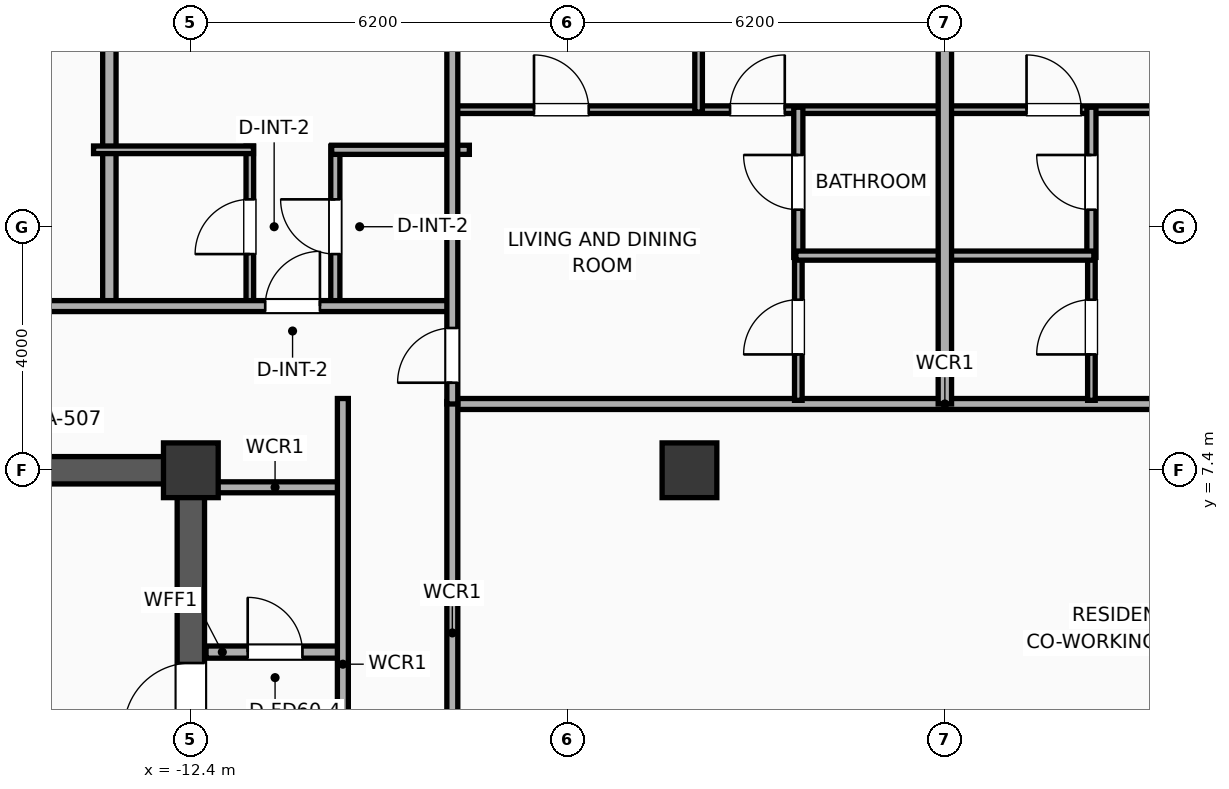
"""IFC4 building model, lengths in metres.
Left out: names, types, materials, properties, quantities, classifications, styles, units other than length and angle.
Written with IfcOpenShell. Run it as: python <this file> out.ifc"""

import sys

from ifc_helpers import new_model, si_unit, direction, frame, frame_2d, origin, origin_2d, place, context, subcontext, project, spatial, rectangle, extrude, element, fill, save


model = new_model("IFC4")
c1 = context("Model", 3, precision=1e-05, world=origin(), true_north=direction((0.0, 1.0)))
c2 = subcontext(c1, "Body", "Model", "MODEL_VIEW")
j1 = project(units=[si_unit("LENGTHUNIT", "METRE"), si_unit("PLANEANGLEUNIT", "RADIAN")], contexts=[c1])
p1 = place(None, origin())
s1 = spatial("IfcSite", under=j1, at=p1, CompositionType="ELEMENT")
p2 = place(p1, origin())
s2 = spatial("IfcBuilding", under=s1, at=p2, CompositionType="ELEMENT")
p3 = place(p2, frame((0.0, 0.0, 200.2)))
s3 = spatial("IfcBuildingStorey", under=s2, at=p3, CompositionType="ELEMENT", Elevation=200.2)
p4 = place(p3, frame((-12.4, 7.4, 0.0), z_axis=(0.0, 0.0, 1.0), x_axis=(1.0, 0.0, 0.0)))
e1 = element("IfcColumn", 1, at=p4, inside=s3, PredefinedType="COLUMN", context=c2, shape_type="SweptSolid", body=[
    extrude(rectangle(XDim=0.9, YDim=0.9, at=origin_2d()), origin(), (0.0, 0.0, 1.0), 3.9),
])
p5 = place(p3, frame((-19.425, 7.4, 0.0), z_axis=(0.0, 0.0, 1.0), x_axis=(1.0, 0.0, 0.0)))
e2 = element("IfcWall", 2, at=p5, inside=s3, PredefinedType="SHEAR", context=c2, shape_type="SweptSolid", body=[
    extrude(rectangle(XDim=7.25, YDim=0.45, at=frame_2d((3.625, 0.0))), origin(), (0.0, 0.0, 1.0), 3.65),
])
p6 = place(p3, frame((-12.4, -7.4, 0.0), z_axis=(0.0, 0.0, 1.0), x_axis=(0.0, 1.0, 0.0)))
e3 = element("IfcWall", 3, at=p6, inside=s3, PredefinedType="SHEAR", context=c2, shape_type="SweptSolid", body=[
    extrude(rectangle(XDim=14.8, YDim=0.45, at=frame_2d((7.4, 0.0))), origin(), (0.0, 0.0, 1.0), 3.65),
])
p7 = place(p6, frame((6.05, 0.0, 0.0)))
e4 = element("IfcOpeningElement", 4, at=p7, cuts=e3, PredefinedType="OPENING", context=c2, shape_type="SweptSolid", body=[
    extrude(rectangle(XDim=1.1, YDim=2.05, at=frame_2d((0.55, 1.025))), frame((0.0, 0.235, 0.0), z_axis=(0.0, -1.0, 0.0), x_axis=(1.0, 0.0, 0.0)), (0.0, 0.0, 1.0), 0.47),
])
p8 = place(p6, frame((8.6, 0.0, 0.0)))
e5 = element("IfcOpeningElement", 5, at=p8, cuts=e3, PredefinedType="OPENING", context=c2, shape_type="SweptSolid", body=[
    extrude(rectangle(XDim=1.1, YDim=2.05, at=frame_2d((0.55, 1.025))), frame((0.0, 0.235, 0.0), z_axis=(0.0, -1.0, 0.0), x_axis=(1.0, 0.0, 0.0)), (0.0, 0.0, 1.0), 0.47),
])
p9 = place(p6, frame((10.53, 0.0, 0.0)))
e6 = element("IfcOpeningElement", 6, at=p9, cuts=e3, PredefinedType="OPENING", context=c2, shape_type="SweptSolid", body=[
    extrude(rectangle(XDim=1.1, YDim=2.05, at=frame_2d((0.55, 1.025))), frame((0.0, 0.235, 0.0), z_axis=(0.0, -1.0, 0.0), x_axis=(1.0, 0.0, 0.0)), (0.0, 0.0, 1.0), 0.47),
])
p10 = place(p6, frame((2.25, 0.0, 0.0)))
e7 = element("IfcOpeningElement", 7, at=p10, cuts=e3, PredefinedType="OPENING", context=c2, shape_type="SweptSolid", body=[
    extrude(rectangle(XDim=0.9, YDim=2.05, at=frame_2d((0.45, 1.025))), frame((0.0, 0.235, 0.0), z_axis=(0.0, -1.0, 0.0), x_axis=(1.0, 0.0, 0.0)), (0.0, 0.0, 1.0), 0.47),
])
p11 = place(p3, frame((-4.2, 7.4, 0.0), z_axis=(0.0, 0.0, 1.0), x_axis=(1.0, 0.0, 0.0)))
e8 = element("IfcColumn", 8, at=p11, inside=s3, PredefinedType="COLUMN", context=c2, shape_type="SweptSolid", body=[
    extrude(rectangle(XDim=0.9, YDim=0.9, at=origin_2d()), origin(), (0.0, 0.0, 1.0), 3.9),
])
p12 = place(p3, frame((-12.15, 4.41, 0.0), z_axis=(0.0, 0.0, 1.0), x_axis=(1.0, 0.0, 0.0)))
e9 = element("IfcWall", 9, at=p12, inside=s3, PredefinedType="PARTITIONING", context=c2, shape_type="SweptSolid", body=[
    extrude(rectangle(XDim=2.27, YDim=0.2, at=frame_2d((1.135, 0.0))), origin(), (0.0, 0.0, 1.0), 3.65),
])
p13 = place(p12, frame((0.685, 0.0, 0.0)))
e10 = element("IfcOpeningElement", 10, at=p13, cuts=e9, PredefinedType="OPENING", context=c2, shape_type="SweptSolid", body=[
    extrude(rectangle(XDim=0.9, YDim=2.05, at=frame_2d((0.45, 1.025))), frame((0.0, 0.11, 0.0), z_axis=(0.0, -1.0, 0.0), x_axis=(1.0, 0.0, 0.0)), (0.0, 0.0, 1.0), 0.22),
])
p14 = place(p3, frame((-12.15, 7.12, 0.0), z_axis=(0.0, 0.0, 1.0), x_axis=(1.0, 0.0, 0.0)))
e11 = element("IfcWall", 11, at=p14, inside=s3, PredefinedType="PARTITIONING", context=c2, shape_type="SweptSolid", body=[
    extrude(rectangle(XDim=2.27, YDim=0.18, at=frame_2d((1.135, 0.0))), origin(), (0.0, 0.0, 1.0), 3.65),
])
p15 = place(p3, frame((-9.9, -8.58, 0.0), z_axis=(0.0, 0.0, 1.0), x_axis=(0.0, 1.0, 0.0)))
e12 = element("IfcWall", 12, at=p15, inside=s3, PredefinedType="PARTITIONING", context=c2, shape_type="SweptSolid", body=[
    extrude(rectangle(XDim=17.16, YDim=0.18, at=frame_2d((8.58, 0.0))), origin(), (0.0, 0.0, 1.0), 3.65),
])
p16 = place(p15, frame((7.172, 0.0, 0.0)))
e13 = element("IfcOpeningElement", 13, at=p16, cuts=e12, PredefinedType="OPENING", context=c2, shape_type="SweptSolid", body=[
    extrude(rectangle(XDim=1.1, YDim=2.05, at=frame_2d((0.55, 1.025))), frame((0.0, 0.1, 0.0), z_axis=(0.0, -1.0, 0.0), x_axis=(1.0, 0.0, 0.0)), (0.0, 0.0, 1.0), 0.2),
])
p17 = place(p3, frame((-8.15, 8.49, 0.0), z_axis=(0.0, 0.0, 1.0), x_axis=(1.0, 0.0, 0.0)))
e14 = element("IfcWall", 14, at=p17, inside=s3, PredefinedType="PARTITIONING", context=c2, shape_type="SweptSolid", body=[
    extrude(rectangle(XDim=16.3, YDim=0.18, at=frame_2d((8.15, 0.0))), origin(), (0.0, 0.0, 1.0), 3.65),
])
p18 = place(p3, frame((-8.1, 0.92, 0.0), z_axis=(0.0, 0.0, 1.0), x_axis=(0.0, 1.0, 0.0)))
e15 = element("IfcWall", 15, at=p18, inside=s3, PredefinedType="PARTITIONING", context=c2, shape_type="SweptSolid", body=[
    extrude(rectangle(XDim=7.61, YDim=0.18, at=frame_2d((3.805, 0.0))), origin(), (0.0, 0.0, 1.0), 3.65),
])
p19 = place(p3, frame((-13.74, 10.02, 0.0), z_axis=(0.0, 0.0, 1.0), x_axis=(0.0, 1.0, 0.0)))
e16 = element("IfcWall", 16, at=p19, inside=s3, PredefinedType="PARTITIONING", context=c2, shape_type="SweptSolid", body=[
    extrude(rectangle(XDim=10.01, YDim=0.22, at=frame_2d((5.005, 0.0))), origin(), (0.0, 0.0, 1.0), 3.65),
])
p20 = place(p3, frame((-11.43, 10.08, 0.0), z_axis=(0.0, 0.0, 1.0), x_axis=(0.0, 1.0, 0.0)))
e17 = element("IfcWall", 17, at=p20, inside=s3, PredefinedType="PARTITIONING", context=c2, shape_type="SweptSolid", body=[
    extrude(rectangle(XDim=2.65, YDim=0.125, at=frame_2d((1.325, 0.0))), origin(), (0.0, 0.0, 1.0), 3.65),
])
p21 = place(p20, frame((0.875, 0.0, 0.0)))
e18 = element("IfcOpeningElement", 18, at=p21, cuts=e17, PredefinedType="OPENING", context=c2, shape_type="SweptSolid", body=[
    extrude(rectangle(XDim=0.9, YDim=2.05, at=frame_2d((0.45, 1.025))), frame((0.0, 0.073, 0.0), z_axis=(0.0, -1.0, 0.0), x_axis=(1.0, 0.0, 0.0)), (0.0, 0.0, 1.0), 0.145),
])
p22 = place(p3, frame((-10.024, 10.08, 0.0), z_axis=(0.0, 0.0, 1.0), x_axis=(0.0, 1.0, 0.0)))
e19 = element("IfcWall", 19, at=p22, inside=s3, PredefinedType="PLUMBINGWALL", context=c2, shape_type="SweptSolid", body=[
    extrude(rectangle(XDim=2.65, YDim=0.15, at=frame_2d((1.325, 0.0))), origin(), (0.0, 0.0, 1.0), 3.65),
])
p23 = place(p22, frame((0.875, 0.0, 0.0)))
e20 = element("IfcOpeningElement", 20, at=p23, cuts=e19, PredefinedType="OPENING", context=c2, shape_type="SweptSolid", body=[
    extrude(rectangle(XDim=0.9, YDim=2.05, at=frame_2d((0.45, 1.025))), frame((0.0, 0.085, 0.0), z_axis=(0.0, -1.0, 0.0), x_axis=(1.0, 0.0, 0.0)), (0.0, 0.0, 1.0), 0.17),
])
p24 = place(p3, frame((-14.0, 12.67, 0.0), z_axis=(0.0, 0.0, 1.0), x_axis=(1.0, 0.0, 0.0)))
e21 = element("IfcWall", 21, at=p24, inside=s3, PredefinedType="PARTITIONING", context=c2, shape_type="SweptSolid", body=[
    extrude(rectangle(XDim=2.63, YDim=0.125, at=frame_2d((1.315, 0.0))), origin(), (0.0, 0.0, 1.0), 3.65),
])
p25 = place(p3, frame((-10.084, 12.67, 0.0), z_axis=(0.0, 0.0, 1.0), x_axis=(1.0, 0.0, 0.0)))
e22 = element("IfcWall", 22, at=p25, inside=s3, PredefinedType="PLUMBINGWALL", context=c2, shape_type="SweptSolid", body=[
    extrude(rectangle(XDim=2.264, YDim=0.15, at=frame_2d((1.132, 0.0))), origin(), (0.0, 0.0, 1.0), 3.65),
])
p26 = place(p3, frame((-19.5, 10.1, 0.0), z_axis=(0.0, 0.0, 1.0), x_axis=(1.0, 0.0, 0.0)))
e23 = element("IfcWall", 23, at=p26, inside=s3, PredefinedType="PARTITIONING", context=c2, shape_type="SweptSolid", body=[
    extrude(rectangle(XDim=11.42, YDim=0.18, at=frame_2d((5.71, 0.0))), origin(), (0.0, 0.0, 1.0), 3.65),
])
p27 = place(p26, frame((3.464, 0.0, 0.0)))
e24 = element("IfcOpeningElement", 24, at=p27, cuts=e23, PredefinedType="OPENING", context=c2, shape_type="SweptSolid", body=[
    extrude(rectangle(XDim=1.15, YDim=2.05, at=frame_2d((0.575, 1.025))), frame((0.0, 0.1, 0.0), z_axis=(0.0, -1.0, 0.0), x_axis=(1.0, 0.0, 0.0)), (0.0, 0.0, 1.0), 0.2),
])
p28 = place(p26, frame((8.323, 0.0, 0.0)))
e25 = element("IfcOpeningElement", 25, at=p28, cuts=e23, PredefinedType="OPENING", context=c2, shape_type="SweptSolid", body=[
    extrude(rectangle(XDim=0.9, YDim=2.05, at=frame_2d((0.45, 1.025))), frame((0.0, 0.1, 0.0), z_axis=(0.0, -1.0, 0.0), x_axis=(1.0, 0.0, 0.0)), (0.0, 0.0, 1.0), 0.2),
])
p29 = place(p3, frame((-8.08, 13.33, 0.0), z_axis=(0.0, 0.0, 1.0), x_axis=(1.0, 0.0, 0.0)))
e26 = element("IfcWall", 26, at=p29, inside=s3, PredefinedType="PARTITIONING", context=c2, shape_type="SweptSolid", body=[
    extrude(rectangle(XDim=8.06, YDim=0.125, at=frame_2d((4.03, 0.0))), origin(), (0.0, 0.0, 1.0), 3.65),
])
p30 = place(p29, frame((1.323, 0.0, 0.0)))
e27 = element("IfcOpeningElement", 27, at=p30, cuts=e26, PredefinedType="OPENING", context=c2, shape_type="SweptSolid", body=[
    extrude(rectangle(XDim=0.9, YDim=2.05, at=frame_2d((0.45, 1.025))), frame((0.0, 0.073, 0.0), z_axis=(0.0, -1.0, 0.0), x_axis=(1.0, 0.0, 0.0)), (0.0, 0.0, 1.0), 0.145),
])
p31 = place(p29, frame((4.547, 0.0, 0.0)))
e28 = element("IfcOpeningElement", 28, at=p31, cuts=e26, PredefinedType="OPENING", context=c2, shape_type="SweptSolid", body=[
    extrude(rectangle(XDim=0.9, YDim=2.05, at=frame_2d((0.45, 1.025))), frame((0.0, 0.073, 0.0), z_axis=(0.0, -1.0, 0.0), x_axis=(1.0, 0.0, 0.0)), (0.0, 0.0, 1.0), 0.145),
])
p32 = place(p3, frame((-2.41, 8.55, 0.0), z_axis=(0.0, 0.0, 1.0), x_axis=(0.0, 1.0, 0.0)))
e29 = element("IfcWall", 29, at=p32, inside=s3, PredefinedType="PARTITIONING", context=c2, shape_type="SweptSolid", body=[
    extrude(rectangle(XDim=2.41, YDim=0.125, at=frame_2d((1.205, 0.0))), origin(), (0.0, 0.0, 1.0), 3.65),
])
p33 = place(p32, frame((0.755, 0.0, 0.0)))
e30 = element("IfcOpeningElement", 30, at=p33, cuts=e29, PredefinedType="OPENING", context=c2, shape_type="SweptSolid", body=[
    extrude(rectangle(XDim=0.9, YDim=2.05, at=frame_2d((0.45, 1.025))), frame((0.0, 0.073, 0.0), z_axis=(0.0, -1.0, 0.0), x_axis=(1.0, 0.0, 0.0)), (0.0, 0.0, 1.0), 0.145),
])
p34 = place(p3, frame((-2.41, 10.9, 0.0), z_axis=(0.0, 0.0, 1.0), x_axis=(0.0, 1.0, 0.0)))
e31 = element("IfcWall", 31, at=p34, inside=s3, PredefinedType="PLUMBINGWALL", context=c2, shape_type="SweptSolid", body=[
    extrude(rectangle(XDim=2.47, YDim=0.15, at=frame_2d((1.235, 0.0))), origin(), (0.0, 0.0, 1.0), 3.65),
])
p35 = place(p34, frame((0.785, 0.0, 0.0)))
e32 = element("IfcOpeningElement", 32, at=p35, cuts=e31, PredefinedType="OPENING", context=c2, shape_type="SweptSolid", body=[
    extrude(rectangle(XDim=0.9, YDim=2.05, at=frame_2d((0.45, 1.025))), frame((0.0, 0.085, 0.0), z_axis=(0.0, -1.0, 0.0), x_axis=(1.0, 0.0, 0.0)), (0.0, 0.0, 1.0), 0.17),
])
p36 = place(p3, frame((-2.45, 10.93, 0.0), z_axis=(0.0, 0.0, 1.0), x_axis=(1.0, 0.0, 0.0)))
e33 = element("IfcWall", 33, at=p36, inside=s3, PredefinedType="PLUMBINGWALL", context=c2, shape_type="SweptSolid", body=[
    extrude(rectangle(XDim=2.43, YDim=0.15, at=frame_2d((1.215, 0.0))), origin(), (0.0, 0.0, 1.0), 3.65),
])
p37 = place(p3, frame((-4.05, 13.29, 0.0), z_axis=(0.0, 0.0, 1.0), x_axis=(0.0, 1.0, 0.0)))
e34 = element("IfcWall", 34, at=p37, inside=s3, PredefinedType="PARTITIONING", context=c2, shape_type="SweptSolid", body=[
    extrude(rectangle(XDim=6.74, YDim=0.125, at=frame_2d((3.37, 0.0))), origin(), (0.0, 0.0, 1.0), 2.54),
])
p38 = place(p3, frame((-8.1, 8.49, 0.0), z_axis=(0.0, 0.0, 1.0), x_axis=(0.0, 1.0, 0.0)))
e35 = element("IfcWall", 35, at=p38, inside=s3, PredefinedType="PARTITIONING", context=c2, shape_type="SweptSolid", body=[
    extrude(rectangle(XDim=11.54, YDim=0.18, at=frame_2d((5.77, 0.0))), origin(), (0.0, 0.0, 1.0), 3.65),
])
p39 = place(p38, frame((0.35, 0.0, 0.0)))
e36 = element("IfcOpeningElement", 36, at=p39, cuts=e35, PredefinedType="OPENING", context=c2, shape_type="SweptSolid", body=[
    extrude(rectangle(XDim=0.9, YDim=2.05, at=frame_2d((0.45, 1.025))), frame((0.0, 0.1, 0.0), z_axis=(0.0, -1.0, 0.0), x_axis=(1.0, 0.0, 0.0)), (0.0, 0.0, 1.0), 0.2),
])
p40 = place(p3, frame((0.02, 13.33, 0.0), z_axis=(0.0, 0.0, 1.0), x_axis=(1.0, 0.0, 0.0)))
e37 = element("IfcWall", 37, at=p40, inside=s3, PredefinedType="PARTITIONING", context=c2, shape_type="SweptSolid", body=[
    extrude(rectangle(XDim=8.06, YDim=0.125, at=frame_2d((4.03, 0.0))), origin(), (0.0, 0.0, 1.0), 3.65),
])
p41 = place(p40, frame((1.323, 0.0, 0.0)))
e38 = element("IfcOpeningElement", 38, at=p41, cuts=e37, PredefinedType="OPENING", context=c2, shape_type="SweptSolid", body=[
    extrude(rectangle(XDim=0.9, YDim=2.05, at=frame_2d((0.45, 1.025))), frame((0.0, 0.073, 0.0), z_axis=(0.0, -1.0, 0.0), x_axis=(1.0, 0.0, 0.0)), (0.0, 0.0, 1.0), 0.145),
])
p42 = place(p40, frame((5.837, 0.0, 0.0)))
e39 = element("IfcOpeningElement", 39, at=p42, cuts=e37, PredefinedType="OPENING", context=c2, shape_type="SweptSolid", body=[
    extrude(rectangle(XDim=0.9, YDim=2.05, at=frame_2d((0.45, 1.025))), frame((0.0, 0.073, 0.0), z_axis=(0.0, -1.0, 0.0), x_axis=(1.0, 0.0, 0.0)), (0.0, 0.0, 1.0), 0.145),
])
p43 = place(p3, frame((2.41, 8.55, 0.0), z_axis=(0.0, 0.0, 1.0), x_axis=(0.0, 1.0, 0.0)))
e40 = element("IfcWall", 40, at=p43, inside=s3, PredefinedType="PARTITIONING", context=c2, shape_type="SweptSolid", body=[
    extrude(rectangle(XDim=2.41, YDim=0.125, at=frame_2d((1.205, 0.0))), origin(), (0.0, 0.0, 1.0), 3.65),
])
p44 = place(p43, frame((0.755, 0.0, 0.0)))
e41 = element("IfcOpeningElement", 41, at=p44, cuts=e40, PredefinedType="OPENING", context=c2, shape_type="SweptSolid", body=[
    extrude(rectangle(XDim=0.9, YDim=2.05, at=frame_2d((0.45, 1.025))), frame((0.0, 0.073, 0.0), z_axis=(0.0, -1.0, 0.0), x_axis=(1.0, 0.0, 0.0)), (0.0, 0.0, 1.0), 0.145),
])
p45 = place(p3, frame((2.41, 10.9, 0.0), z_axis=(0.0, 0.0, 1.0), x_axis=(0.0, 1.0, 0.0)))
e42 = element("IfcWall", 42, at=p45, inside=s3, PredefinedType="PLUMBINGWALL", context=c2, shape_type="SweptSolid", body=[
    extrude(rectangle(XDim=2.47, YDim=0.15, at=frame_2d((1.235, 0.0))), origin(), (0.0, 0.0, 1.0), 3.65),
])
p46 = place(p45, frame((0.785, 0.0, 0.0)))
e43 = element("IfcOpeningElement", 43, at=p46, cuts=e42, PredefinedType="OPENING", context=c2, shape_type="SweptSolid", body=[
    extrude(rectangle(XDim=0.9, YDim=2.05, at=frame_2d((0.45, 1.025))), frame((0.0, 0.085, 0.0), z_axis=(0.0, -1.0, 0.0), x_axis=(1.0, 0.0, 0.0)), (0.0, 0.0, 1.0), 0.17),
])
p47 = place(p3, frame((0.02, 10.93, 0.0), z_axis=(0.0, 0.0, 1.0), x_axis=(1.0, 0.0, 0.0)))
e44 = element("IfcWall", 44, at=p47, inside=s3, PredefinedType="PLUMBINGWALL", context=c2, shape_type="SweptSolid", body=[
    extrude(rectangle(XDim=2.43, YDim=0.15, at=frame_2d((1.215, 0.0))), origin(), (0.0, 0.0, 1.0), 3.65),
])
p48 = place(p3, frame((0.0, 8.49, 0.0), z_axis=(0.0, 0.0, 1.0), x_axis=(0.0, 1.0, 0.0)))
e45 = element("IfcWall", 45, at=p48, inside=s3, PredefinedType="PARTITIONING", context=c2, shape_type="SweptSolid", body=[
    extrude(rectangle(XDim=11.54, YDim=0.22, at=frame_2d((5.77, 0.0))), origin(), (0.0, 0.0, 1.0), 3.65),
])
p49 = place(p13, origin())
e46 = element("IfcDoor", 46, at=p49, inside=s3, OperationType="SINGLE_SWING_LEFT", PredefinedType="DOOR", context=c2, shape_type="SweptSolid", body=[
    extrude(rectangle(XDim=0.9, YDim=2.05, at=frame_2d((0.45, 1.025))), frame((0.0, 0.025, 0.0), z_axis=(0.0, -1.0, 0.0), x_axis=(1.0, 0.0, 0.0)), (0.0, 0.0, 1.0), 0.05),
])
fill(e10, e46)
p50 = place(p21, origin())
e47 = element("IfcDoor", 47, at=p50, inside=s3, OperationType="SINGLE_SWING_LEFT", PredefinedType="DOOR", context=c2, shape_type="SweptSolid", body=[
    extrude(rectangle(XDim=0.9, YDim=2.05, at=frame_2d((0.45, 1.025))), frame((0.0, 0.025, 0.0), z_axis=(0.0, -1.0, 0.0), x_axis=(1.0, 0.0, 0.0)), (0.0, 0.0, 1.0), 0.05),
])
fill(e18, e47)
p51 = place(p23, origin())
e48 = element("IfcDoor", 48, at=p51, inside=s3, OperationType="SINGLE_SWING_RIGHT", PredefinedType="DOOR", context=c2, shape_type="SweptSolid", body=[
    extrude(rectangle(XDim=0.9, YDim=2.05, at=frame_2d((0.45, 1.025))), frame((0.0, 0.025, 0.0), z_axis=(0.0, -1.0, 0.0), x_axis=(1.0, 0.0, 0.0)), (0.0, 0.0, 1.0), 0.05),
])
fill(e20, e48)
p52 = place(p28, origin())
e49 = element("IfcDoor", 49, at=p52, inside=s3, OperationType="SINGLE_SWING_RIGHT", PredefinedType="DOOR", context=c2, shape_type="SweptSolid", body=[
    extrude(rectangle(XDim=0.9, YDim=2.05, at=frame_2d((0.45, 1.025))), frame((0.0, 0.025, 0.0), z_axis=(0.0, -1.0, 0.0), x_axis=(1.0, 0.0, 0.0)), (0.0, 0.0, 1.0), 0.05),
])
fill(e25, e49)
p53 = place(p30, origin())
e50 = element("IfcDoor", 50, at=p53, inside=s3, OperationType="SINGLE_SWING_LEFT", PredefinedType="DOOR", context=c2, shape_type="SweptSolid", body=[
    extrude(rectangle(XDim=0.9, YDim=2.05, at=frame_2d((0.45, 1.025))), frame((0.0, 0.025, 0.0), z_axis=(0.0, -1.0, 0.0), x_axis=(1.0, 0.0, 0.0)), (0.0, 0.0, 1.0), 0.05),
])
fill(e27, e50)
p54 = place(p31, origin())
e51 = element("IfcDoor", 51, at=p54, inside=s3, OperationType="SINGLE_SWING_RIGHT", PredefinedType="DOOR", context=c2, shape_type="SweptSolid", body=[
    extrude(rectangle(XDim=0.9, YDim=2.05, at=frame_2d((0.45, 1.025))), frame((0.0, 0.025, 0.0), z_axis=(0.0, -1.0, 0.0), x_axis=(1.0, 0.0, 0.0)), (0.0, 0.0, 1.0), 0.05),
])
fill(e28, e51)
p55 = place(p33, origin())
e52 = element("IfcDoor", 52, at=p55, inside=s3, OperationType="SINGLE_SWING_LEFT", PredefinedType="DOOR", context=c2, shape_type="SweptSolid", body=[
    extrude(rectangle(XDim=0.9, YDim=2.05, at=frame_2d((0.45, 1.025))), frame((0.0, 0.025, 0.0), z_axis=(0.0, -1.0, 0.0), x_axis=(1.0, 0.0, 0.0)), (0.0, 0.0, 1.0), 0.05),
])
fill(e30, e52)
p56 = place(p35, origin())
e53 = element("IfcDoor", 53, at=p56, inside=s3, OperationType="SINGLE_SWING_RIGHT", PredefinedType="DOOR", context=c2, shape_type="SweptSolid", body=[
    extrude(rectangle(XDim=0.9, YDim=2.05, at=frame_2d((0.45, 1.025))), frame((0.0, 0.025, 0.0), z_axis=(0.0, -1.0, 0.0), x_axis=(1.0, 0.0, 0.0)), (0.0, 0.0, 1.0), 0.05),
])
fill(e32, e53)
p57 = place(p39, origin())
e54 = element("IfcDoor", 54, at=p57, inside=s3, OperationType="SINGLE_SWING_LEFT", PredefinedType="DOOR", context=c2, shape_type="SweptSolid", body=[
    extrude(rectangle(XDim=0.9, YDim=2.05, at=frame_2d((0.45, 1.025))), frame((0.0, 0.025, 0.0), z_axis=(0.0, -1.0, 0.0), x_axis=(1.0, 0.0, 0.0)), (0.0, 0.0, 1.0), 0.05),
])
fill(e36, e54)
p58 = place(p41, origin())
e55 = element("IfcDoor", 55, at=p58, inside=s3, OperationType="SINGLE_SWING_LEFT", PredefinedType="DOOR", context=c2, shape_type="SweptSolid", body=[
    extrude(rectangle(XDim=0.9, YDim=2.05, at=frame_2d((0.45, 1.025))), frame((0.0, 0.025, 0.0), z_axis=(0.0, -1.0, 0.0), x_axis=(1.0, 0.0, 0.0)), (0.0, 0.0, 1.0), 0.05),
])
fill(e38, e55)
p59 = place(p44, origin())
e56 = element("IfcDoor", 56, at=p59, inside=s3, OperationType="SINGLE_SWING_LEFT", PredefinedType="DOOR", context=c2, shape_type="SweptSolid", body=[
    extrude(rectangle(XDim=0.9, YDim=2.05, at=frame_2d((0.45, 1.025))), frame((0.0, 0.025, 0.0), z_axis=(0.0, -1.0, 0.0), x_axis=(1.0, 0.0, 0.0)), (0.0, 0.0, 1.0), 0.05),
])
fill(e41, e56)
p60 = place(p46, origin())
e57 = element("IfcDoor", 57, at=p60, inside=s3, OperationType="SINGLE_SWING_RIGHT", PredefinedType="DOOR", context=c2, shape_type="SweptSolid", body=[
    extrude(rectangle(XDim=0.9, YDim=2.05, at=frame_2d((0.45, 1.025))), frame((0.0, 0.025, 0.0), z_axis=(0.0, -1.0, 0.0), x_axis=(1.0, 0.0, 0.0)), (0.0, 0.0, 1.0), 0.05),
])
fill(e43, e57)
p61 = place(p9, origin())
e58 = element("IfcDoor", 58, at=p61, inside=s3, OperationType="SINGLE_SWING_LEFT", PredefinedType="DOOR", context=c2, shape_type="SweptSolid", body=[
    extrude(rectangle(XDim=1.1, YDim=2.05, at=frame_2d((0.55, 1.025))), frame((0.0, 0.025, 0.0), z_axis=(0.0, -1.0, 0.0), x_axis=(1.0, 0.0, 0.0)), (0.0, 0.0, 1.0), 0.05),
])
fill(e6, e58)
save(model, sys.argv[1])
